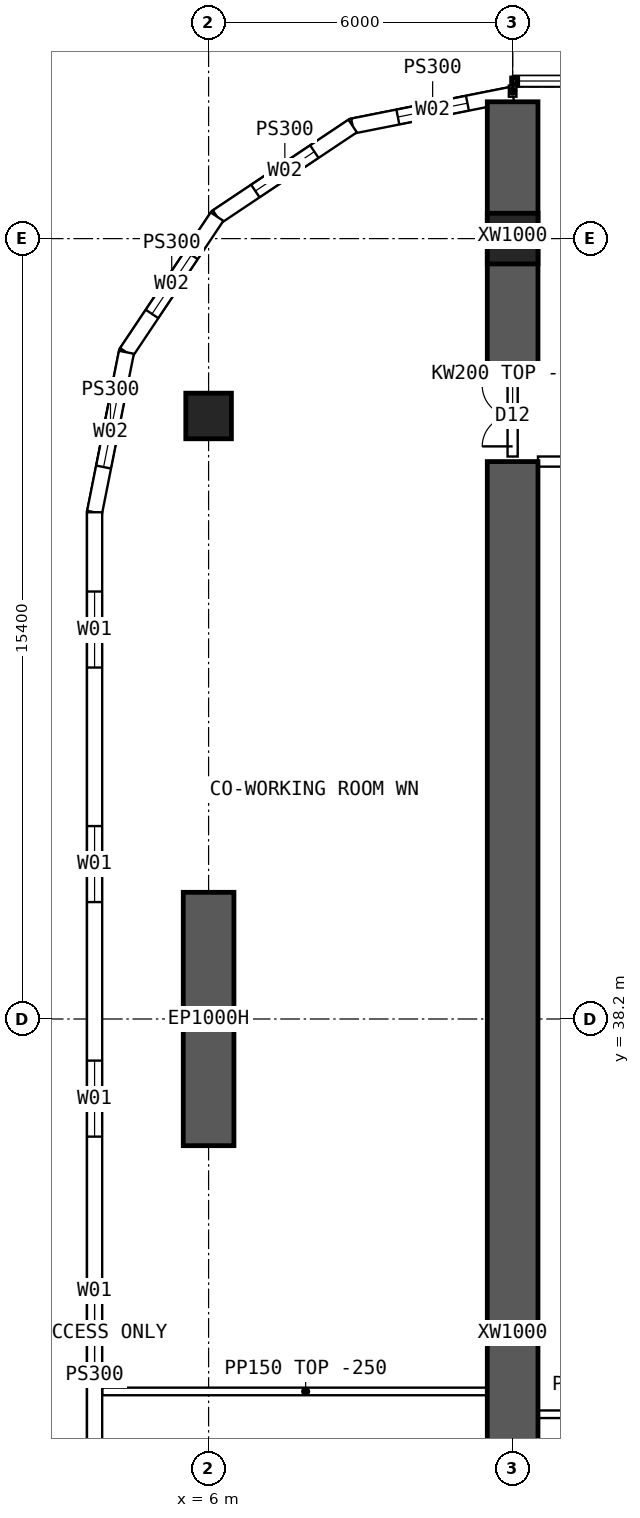
"""IFC4 building model, lengths in metres.
Left out: names, types, materials, properties, quantities, classifications, styles, units other than length and angle.
Written with IfcOpenShell. Run it as: python <this file> out.ifc"""

import sys

from ifc_helpers import new_model, si_unit, direction, frame, frame_2d, origin, origin_2d, place, context, subcontext, project, spatial, polyline, rectangle, hollow_rectangle, outline, extrude, element, fill, save


model = new_model("IFC4")
c1 = context("Model", 3, precision=1e-05, world=origin(), true_north=direction((0.0, 1.0)))
c2 = subcontext(c1, "Body", "Model", "MODEL_VIEW")
j1 = project(units=[si_unit("LENGTHUNIT", "METRE"), si_unit("PLANEANGLEUNIT", "RADIAN")], contexts=[c1])
p1 = place(None, origin())
s1 = spatial("IfcSite", under=j1, at=p1, CompositionType="ELEMENT")
p2 = place(p1, origin())
s2 = spatial("IfcBuilding", under=s1, at=p2, CompositionType="ELEMENT")
p3 = place(p2, frame((0.0, 0.0, 16.0)))
s3 = spatial("IfcBuildingStorey", under=s2, at=p3, CompositionType="ELEMENT", Elevation=16.0)
p4 = place(p3, frame((12.0, 53.6, 0.0), z_axis=(0.0, 0.0, 1.0), x_axis=(1.0, 0.0, 0.0)))
e1 = element("IfcColumn", 1, at=p4, inside=s3, PredefinedType="COLUMN", context=c2, shape_type="SweptSolid", body=[
    extrude(hollow_rectangle(XDim=1.0, YDim=1.0, WallThickness=0.1, at=origin_2d()), origin(), (0.0, 0.0, 1.0), 4.2),
])
p5 = place(p3, frame((6.0, 50.1, 0.0), z_axis=(0.0, 0.0, 1.0), x_axis=(1.0, 0.0, 0.0)))
e2 = element("IfcColumn", 2, at=p5, inside=s3, PredefinedType="COLUMN", context=c2, shape_type="SweptSolid", body=[
    extrude(hollow_rectangle(XDim=0.9, YDim=0.9, WallThickness=0.09, at=origin_2d()), origin(), (0.0, 0.0, 1.0), 4.2),
])
p6 = place(p3, frame((6.0, 35.7, 0.0), z_axis=(0.0, 0.0, 1.0), x_axis=(0.0, 1.0, 0.0)))
e3 = element("IfcWall", 3, at=p6, inside=s3, PredefinedType="SHEAR", context=c2, shape_type="SweptSolid", body=[
    extrude(rectangle(XDim=5.0, YDim=1.0, at=frame_2d((2.5, 0.0))), origin(), (0.0, 0.0, 1.0), 4.2),
])
p7 = place(p3, frame((12.0, 51.0, 0.0), z_axis=(0.0, 0.0, 1.0), x_axis=(0.0, 1.0, 0.0)))
e4 = element("IfcWall", 4, at=p7, inside=s3, PredefinedType="SHEAR", context=c2, shape_type="SweptSolid", body=[
    extrude(rectangle(XDim=5.3, YDim=1.0, at=frame_2d((2.65, 0.0))), origin(), (0.0, 0.0, 1.0), 4.2),
])
p8 = place(p3, frame((12.0, 14.8, 0.0), z_axis=(0.0, 0.0, 1.0), x_axis=(0.0, 1.0, 0.0)))
e5 = element("IfcWall", 5, at=p8, inside=s3, PredefinedType="SHEAR", context=c2, shape_type="SweptSolid", body=[
    extrude(rectangle(XDim=34.4, YDim=1.0, at=frame_2d((17.2, 0.0))), origin(), (0.0, 0.0, 1.0), 4.2),
])
p9 = place(p3, frame((3.75, 48.2, 0.0), z_axis=(0.0, 0.0, 1.0), x_axis=(0.0, -1.0, 0.0)))
e6 = element("IfcWall", 6, at=p9, inside=s3, PredefinedType="SOLIDWALL", context=c2, shape_type="SweptSolid", body=[
    extrude(outline(polyline([(-0.015, -0.15), (32.415, -0.15), (32.385, 0.15), (0.015, 0.15), (-0.015, -0.15)])), origin(), (0.0, 0.0, 1.0), 3.95),
])
p10 = place(p9, frame((1.564, 0.0, 0.9)))
e7 = element("IfcOpeningElement", 7, at=p10, cuts=e6, PredefinedType="OPENING", context=c2, shape_type="SweptSolid", body=[
    extrude(rectangle(XDim=1.5, YDim=2.0, at=frame_2d((0.75, 1.0))), frame((0.0, 0.16, 0.0), z_axis=(0.0, -1.0, 0.0), x_axis=(1.0, 0.0, 0.0)), (0.0, 0.0, 1.0), 0.32),
])
p11 = place(p9, frame((6.193, 0.0, 0.9)))
e8 = element("IfcOpeningElement", 8, at=p11, cuts=e6, PredefinedType="OPENING", context=c2, shape_type="SweptSolid", body=[
    extrude(rectangle(XDim=1.5, YDim=2.0, at=frame_2d((0.75, 1.0))), frame((0.0, 0.16, 0.0), z_axis=(0.0, -1.0, 0.0), x_axis=(1.0, 0.0, 0.0)), (0.0, 0.0, 1.0), 0.32),
])
p12 = place(p9, frame((10.822, 0.0, 0.9)))
e9 = element("IfcOpeningElement", 9, at=p12, cuts=e6, PredefinedType="OPENING", context=c2, shape_type="SweptSolid", body=[
    extrude(rectangle(XDim=1.5, YDim=2.0, at=frame_2d((0.75, 1.0))), frame((0.0, 0.16, 0.0), z_axis=(0.0, -1.0, 0.0), x_axis=(1.0, 0.0, 0.0)), (0.0, 0.0, 1.0), 0.32),
])
p13 = place(p9, frame((15.45, 0.0, 0.9)))
e10 = element("IfcOpeningElement", 10, at=p13, cuts=e6, PredefinedType="OPENING", context=c2, shape_type="SweptSolid", body=[
    extrude(rectangle(XDim=1.5, YDim=2.0, at=frame_2d((0.75, 1.0))), frame((0.0, 0.16, 0.0), z_axis=(0.0, -1.0, 0.0), x_axis=(1.0, 0.0, 0.0)), (0.0, 0.0, 1.0), 0.32),
])
p14 = place(p9, frame((20.079, 0.0, 0.9)))
e11 = element("IfcOpeningElement", 11, at=p14, cuts=e6, PredefinedType="OPENING", context=c2, shape_type="SweptSolid", body=[
    extrude(rectangle(XDim=1.5, YDim=2.0, at=frame_2d((0.75, 1.0))), frame((0.0, 0.16, 0.0), z_axis=(0.0, -1.0, 0.0), x_axis=(1.0, 0.0, 0.0)), (0.0, 0.0, 1.0), 0.32),
])
p15 = place(p9, frame((24.707, 0.0, 0.9)))
e12 = element("IfcOpeningElement", 12, at=p15, cuts=e6, PredefinedType="OPENING", context=c2, shape_type="SweptSolid", body=[
    extrude(rectangle(XDim=1.5, YDim=2.0, at=frame_2d((0.75, 1.0))), frame((0.0, 0.16, 0.0), z_axis=(0.0, -1.0, 0.0), x_axis=(1.0, 0.0, 0.0)), (0.0, 0.0, 1.0), 0.32),
])
p16 = place(p9, frame((29.336, 0.0, 0.9)))
e13 = element("IfcOpeningElement", 13, at=p16, cuts=e6, PredefinedType="OPENING", context=c2, shape_type="SweptSolid", body=[
    extrude(rectangle(XDim=1.5, YDim=2.0, at=frame_2d((0.75, 1.0))), frame((0.0, 0.16, 0.0), z_axis=(0.0, -1.0, 0.0), x_axis=(1.0, 0.0, 0.0)), (0.0, 0.0, 1.0), 0.32),
])
p17 = place(p3, frame((12.0, 56.45, 0.0), z_axis=(0.0, 0.0, 1.0), x_axis=(-0.980787251524, -0.195080412259, 0.0)))
e14 = element("IfcWall", 14, at=p17, inside=s3, PredefinedType="SOLIDWALL", context=c2, shape_type="SweptSolid", body=[
    extrude(outline(polyline([(-0.03, -0.15), (3.249, -0.15), (3.189, 0.15), (0.03, 0.15), (-0.03, -0.15)])), origin(), (0.0, 0.0, 1.0), 3.95),
])
p18 = place(p17, frame((0.909, 0.0, 0.9)))
e15 = element("IfcOpeningElement", 15, at=p18, cuts=e14, PredefinedType="OPENING", context=c2, shape_type="SweptSolid", body=[
    extrude(rectangle(XDim=1.4, YDim=1.8, at=frame_2d((0.7, 0.9))), frame((0.0, 0.16, 0.0), z_axis=(0.0, -1.0, 0.0), x_axis=(1.0, 0.0, 0.0)), (0.0, 0.0, 1.0), 0.32),
])
p19 = place(p3, frame((8.843, 55.822, 0.0), z_axis=(0.0, 0.0, 1.0), x_axis=(-0.831478105043, -0.555557522525, 0.0)))
e16 = element("IfcWall", 16, at=p19, inside=s3, PredefinedType="SOLIDWALL", context=c2, shape_type="SweptSolid", body=[
    extrude(outline(polyline([(-0.03, -0.15), (3.249, -0.15), (3.189, 0.15), (0.03, 0.15), (-0.03, -0.15)])), origin(), (0.0, 0.0, 1.0), 3.95),
])
p20 = place(p19, frame((0.909, 0.0, 0.9)))
e17 = element("IfcOpeningElement", 17, at=p20, cuts=e16, PredefinedType="OPENING", context=c2, shape_type="SweptSolid", body=[
    extrude(rectangle(XDim=1.4, YDim=1.8, at=frame_2d((0.7, 0.9))), frame((0.0, 0.16, 0.0), z_axis=(0.0, -1.0, 0.0), x_axis=(1.0, 0.0, 0.0)), (0.0, 0.0, 1.0), 0.32),
])
p21 = place(p3, frame((6.167, 54.034, 0.0), z_axis=(0.0, 0.0, 1.0), x_axis=(-0.555609954424, -0.831443069936, 0.0)))
e18 = element("IfcWall", 18, at=p21, inside=s3, PredefinedType="SOLIDWALL", context=c2, shape_type="SweptSolid", body=[
    extrude(outline(polyline([(-0.03, -0.15), (3.249, -0.15), (3.189, 0.15), (0.03, 0.15), (-0.03, -0.15)])), origin(), (0.0, 0.0, 1.0), 3.95),
])
p22 = place(p21, frame((0.909, 0.0, 0.9)))
e19 = element("IfcOpeningElement", 19, at=p22, cuts=e18, PredefinedType="OPENING", context=c2, shape_type="SweptSolid", body=[
    extrude(rectangle(XDim=1.4, YDim=1.8, at=frame_2d((0.7, 0.9))), frame((0.0, 0.16, 0.0), z_axis=(0.0, -1.0, 0.0), x_axis=(1.0, 0.0, 0.0)), (0.0, 0.0, 1.0), 0.32),
])
p23 = place(p3, frame((4.378, 51.357, 0.0), z_axis=(0.0, 0.0, 1.0), x_axis=(-0.195065901187, -0.980790137692, 0.0)))
e20 = element("IfcWall", 20, at=p23, inside=s3, PredefinedType="SOLIDWALL", context=c2, shape_type="SweptSolid", body=[
    extrude(outline(polyline([(-0.03, -0.15), (3.234, -0.15), (3.204, 0.15), (0.03, 0.15), (-0.03, -0.15)])), origin(), (0.0, 0.0, 1.0), 3.95),
])
p24 = place(p23, frame((0.909, 0.0, 0.9)))
e21 = element("IfcOpeningElement", 21, at=p24, cuts=e20, PredefinedType="OPENING", context=c2, shape_type="SweptSolid", body=[
    extrude(rectangle(XDim=1.4, YDim=1.8, at=frame_2d((0.7, 0.9))), frame((0.0, 0.16, 0.0), z_axis=(0.0, -1.0, 0.0), x_axis=(1.0, 0.0, 0.0)), (0.0, 0.0, 1.0), 0.32),
])
p25 = place(p3, frame((12.5, 51.0, 0.0), z_axis=(0.0, 0.0, 1.0), x_axis=(1.0, 0.0, 0.0)))
e22 = element("IfcWall", 22, at=p25, inside=s3, PredefinedType="SOLIDWALL", context=c2, shape_type="SweptSolid", body=[
    extrude(outline(polyline([(0.0, 0.0), (5.0, 0.0), (5.0, 3.55), (0.0, 3.55), (0.0, 0.0)])), frame((0.0, 0.1, 0.0), z_axis=(0.0, -1.0, 0.0), x_axis=(1.0, 0.0, 0.0)), (0.0, 0.0, 1.0), 0.2),
])
p26 = place(p25, frame((1.0, 0.0, 0.0)))
e23 = element("IfcOpeningElement", 23, at=p26, cuts=e22, PredefinedType="OPENING", context=c2, shape_type="SweptSolid", body=[
    extrude(rectangle(XDim=1.8, YDim=2.1, at=frame_2d((0.9, 1.05))), frame((0.0, 0.11, 0.0), z_axis=(0.0, -1.0, 0.0), x_axis=(1.0, 0.0, 0.0)), (0.0, 0.0, 1.0), 0.22),
])
p27 = place(p3, frame((12.5, 49.2, 0.0), z_axis=(0.0, 0.0, 1.0), x_axis=(1.0, 0.0, 0.0)))
e24 = element("IfcWall", 24, at=p27, inside=s3, PredefinedType="SOLIDWALL", context=c2, shape_type="SweptSolid", body=[
    extrude(rectangle(XDim=5.0, YDim=0.2, at=frame_2d((2.5, 0.0))), origin(), (0.0, 0.0, 1.0), 3.95),
])
p28 = place(p27, frame((3.3, 0.0, 0.0)))
e25 = element("IfcOpeningElement", 25, at=p28, cuts=e24, PredefinedType="OPENING", context=c2, shape_type="SweptSolid", body=[
    extrude(rectangle(XDim=1.6, YDim=2.1, at=frame_2d((0.8, 1.05))), frame((0.0, 0.11, 0.0), z_axis=(0.0, -1.0, 0.0), x_axis=(1.0, 0.0, 0.0)), (0.0, 0.0, 1.0), 0.22),
])
p29 = place(p3, frame((12.0, 30.4, 0.0), z_axis=(0.0, 0.0, 1.0), x_axis=(1.0, 0.0, 0.0)))
e26 = element("IfcWall", 26, at=p29, inside=s3, PredefinedType="PARTITIONING", context=c2, shape_type="SweptSolid", body=[
    extrude(rectangle(XDim=3.6, YDim=0.15, at=frame_2d((1.8, 0.0))), origin(), (0.0, 0.0, 1.0), 3.95),
])
p30 = place(p3, frame((3.905, 30.85, 0.0), z_axis=(0.0, 0.0, 1.0), x_axis=(1.0, 0.0, 0.0)))
e27 = element("IfcWall", 27, at=p30, inside=s3, PredefinedType="PARTITIONING", context=c2, shape_type="SweptSolid", body=[
    extrude(outline(polyline([(0.0, 0.0), (8.02, 0.0), (8.02, 3.95), (2.397, 3.95), (2.395, 3.5), (1.797, 3.5), (1.795, 3.95), (0.0, 3.95), (0.0, 0.0)])), frame((0.0, 0.075, 0.0), z_axis=(0.0, -1.0, 0.0), x_axis=(1.0, 0.0, 0.0)), (0.0, 0.0, 1.0), 0.15),
])
p31 = place(p3, frame((12.0, 49.3, 0.0), z_axis=(0.0, 0.0, 1.0), x_axis=(0.0, 1.0, 0.0)))
e28 = element("IfcWall", 28, at=p31, inside=s3, PredefinedType="SOLIDWALL", context=c2, shape_type="SweptSolid", body=[
    extrude(outline(polyline([(0.0, 0.0), (1.6, 0.0), (1.6, 3.5), (0.0, 3.5), (0.0, 0.0)])), frame((0.0, 0.1, 0.0), z_axis=(0.0, -1.0, 0.0), x_axis=(1.0, 0.0, 0.0)), (0.0, 0.0, 1.0), 0.2),
])
p32 = place(p31, frame((0.2, 0.0, 0.0)))
e29 = element("IfcOpeningElement", 29, at=p32, cuts=e28, PredefinedType="OPENING", context=c2, shape_type="SweptSolid", body=[
    extrude(rectangle(XDim=1.2, YDim=2.1, at=frame_2d((0.6, 1.05))), frame((0.0, 0.11, 0.0), z_axis=(0.0, -1.0, 0.0), x_axis=(1.0, 0.0, 0.0)), (0.0, 0.0, 1.0), 0.22),
])
p33 = place(p3, frame((12.0, 56.4, 0.0), z_axis=(0.0, 0.0, 1.0), x_axis=(0.0, 1.0, 0.0)))
e30 = element("IfcWall", 30, at=p33, inside=s3, PredefinedType="PARTITIONING", context=c2, shape_type="SweptSolid", body=[
    extrude(rectangle(XDim=0.22, YDim=0.15, at=frame_2d((0.11, 0.0))), origin(), (0.0, 0.0, 1.0), 3.95),
])
p34 = place(p10, origin())
e31 = element("IfcWindow", 31, at=p34, inside=s3, PartitioningType="SINGLE_PANEL", PredefinedType="WINDOW", context=c2, shape_type="SweptSolid", body=[
    extrude(rectangle(XDim=1.5, YDim=2.0, at=frame_2d((0.75, 1.0))), frame((0.0, 0.03, 0.0), z_axis=(0.0, -1.0, 0.0), x_axis=(1.0, 0.0, 0.0)), (0.0, 0.0, 1.0), 0.06),
])
fill(e7, e31)
p35 = place(p11, origin())
e32 = element("IfcWindow", 32, at=p35, inside=s3, PartitioningType="SINGLE_PANEL", PredefinedType="WINDOW", context=c2, shape_type="SweptSolid", body=[
    extrude(rectangle(XDim=1.5, YDim=2.0, at=frame_2d((0.75, 1.0))), frame((0.0, 0.03, 0.0), z_axis=(0.0, -1.0, 0.0), x_axis=(1.0, 0.0, 0.0)), (0.0, 0.0, 1.0), 0.06),
])
fill(e8, e32)
p36 = place(p12, origin())
e33 = element("IfcWindow", 33, at=p36, inside=s3, PartitioningType="SINGLE_PANEL", PredefinedType="WINDOW", context=c2, shape_type="SweptSolid", body=[
    extrude(rectangle(XDim=1.5, YDim=2.0, at=frame_2d((0.75, 1.0))), frame((0.0, 0.03, 0.0), z_axis=(0.0, -1.0, 0.0), x_axis=(1.0, 0.0, 0.0)), (0.0, 0.0, 1.0), 0.06),
])
fill(e9, e33)
p37 = place(p13, origin())
e34 = element("IfcWindow", 34, at=p37, inside=s3, PartitioningType="SINGLE_PANEL", PredefinedType="WINDOW", context=c2, shape_type="SweptSolid", body=[
    extrude(rectangle(XDim=1.5, YDim=2.0, at=frame_2d((0.75, 1.0))), frame((0.0, 0.03, 0.0), z_axis=(0.0, -1.0, 0.0), x_axis=(1.0, 0.0, 0.0)), (0.0, 0.0, 1.0), 0.06),
])
fill(e10, e34)
p38 = place(p18, origin())
e35 = element("IfcWindow", 35, at=p38, inside=s3, PartitioningType="SINGLE_PANEL", PredefinedType="WINDOW", context=c2, shape_type="SweptSolid", body=[
    extrude(rectangle(XDim=1.4, YDim=1.8, at=frame_2d((0.7, 0.9))), frame((0.0, 0.03, 0.0), z_axis=(0.0, -1.0, 0.0), x_axis=(1.0, 0.0, 0.0)), (0.0, 0.0, 1.0), 0.06),
])
fill(e15, e35)
p39 = place(p20, origin())
e36 = element("IfcWindow", 36, at=p39, inside=s3, PartitioningType="SINGLE_PANEL", PredefinedType="WINDOW", context=c2, shape_type="SweptSolid", body=[
    extrude(rectangle(XDim=1.4, YDim=1.8, at=frame_2d((0.7, 0.9))), frame((0.0, 0.03, 0.0), z_axis=(0.0, -1.0, 0.0), x_axis=(1.0, 0.0, 0.0)), (0.0, 0.0, 1.0), 0.06),
])
fill(e17, e36)
p40 = place(p22, origin())
e37 = element("IfcWindow", 37, at=p40, inside=s3, PartitioningType="SINGLE_PANEL", PredefinedType="WINDOW", context=c2, shape_type="SweptSolid", body=[
    extrude(rectangle(XDim=1.4, YDim=1.8, at=frame_2d((0.7, 0.9))), frame((0.0, 0.03, 0.0), z_axis=(0.0, -1.0, 0.0), x_axis=(1.0, 0.0, 0.0)), (0.0, 0.0, 1.0), 0.06),
])
fill(e19, e37)
p41 = place(p24, origin())
e38 = element("IfcWindow", 38, at=p41, inside=s3, PartitioningType="SINGLE_PANEL", PredefinedType="WINDOW", context=c2, shape_type="SweptSolid", body=[
    extrude(rectangle(XDim=1.4, YDim=1.8, at=frame_2d((0.7, 0.9))), frame((0.0, 0.03, 0.0), z_axis=(0.0, -1.0, 0.0), x_axis=(1.0, 0.0, 0.0)), (0.0, 0.0, 1.0), 0.06),
])
fill(e21, e38)
p42 = place(p32, origin())
e39 = element("IfcDoor", 39, at=p42, inside=s3, OperationType="DOUBLE_DOOR_SINGLE_SWING", PredefinedType="DOOR", context=c2, shape_type="SweptSolid", body=[
    extrude(rectangle(XDim=1.2, YDim=2.1, at=frame_2d((0.6, 1.05))), frame((0.0, 0.025, 0.0), z_axis=(0.0, -1.0, 0.0), x_axis=(1.0, 0.0, 0.0)), (0.0, 0.0, 1.0), 0.05),
])
fill(e29, e39)
save(model, sys.argv[1])
